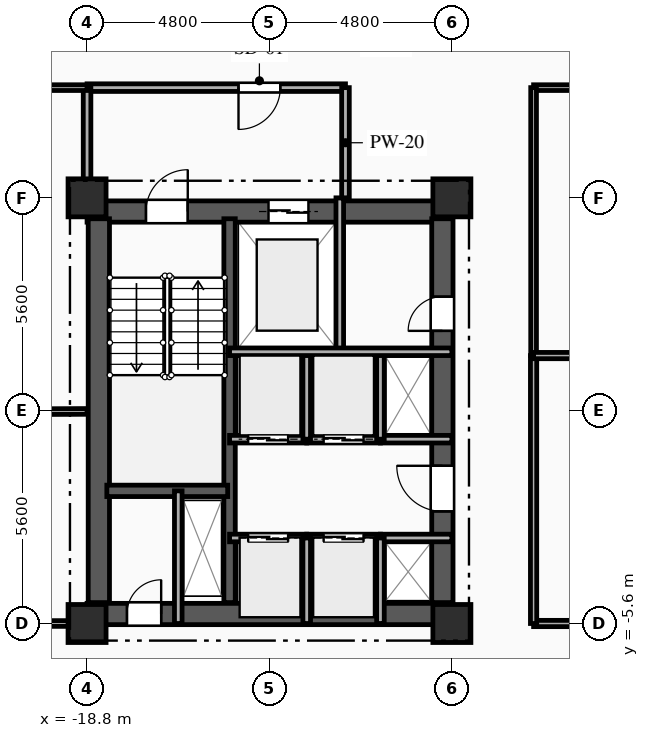
"""IFC4 building model, lengths in metres.
Left out: names, types, materials, properties, quantities, classifications, styles, units other than length and angle.
Written with IfcOpenShell. Run it as: python <this file> out.ifc"""

import sys

from ifc_helpers import new_model, si_unit, direction, frame, frame_2d, origin, origin_2d, place, context, subcontext, project, spatial, rectangle, extrude, element, fill, save


model = new_model("IFC4")
c1 = context("Model", 3, precision=1e-05, world=origin(), true_north=direction((0.0, 1.0)))
c2 = subcontext(c1, "Body", "Model", "MODEL_VIEW")
j1 = project(units=[si_unit("LENGTHUNIT", "METRE"), si_unit("PLANEANGLEUNIT", "RADIAN")], contexts=[c1])
p1 = place(None, origin())
s1 = spatial("IfcSite", under=j1, at=p1, CompositionType="ELEMENT")
p2 = place(p1, origin())
s2 = spatial("IfcBuilding", under=s1, at=p2, CompositionType="ELEMENT")
p3 = place(p2, frame((0.0, 0.0, 115.85)))
s3 = spatial("IfcBuildingStorey", under=s2, at=p3, CompositionType="ELEMENT", Elevation=115.85)
for number, where, z_axis, x_axis in (
    (1, (-18.8, -5.6, 0.0), (0.0, 0.0, 1.0), (1.0, 0.0, 0.0)),
    (2, (-18.8, 5.6, 0.0), (0.0, 0.0, 1.0), (1.0, 0.0, 0.0)),
    (3, (-9.2, -5.6, 0.0), (0.0, 0.0, 1.0), (1.0, 0.0, 0.0)),
    (4, (-9.2, 5.6, 0.0), (0.0, 0.0, 1.0), (1.0, 0.0, 0.0)),
):
    element("IfcColumn", number, at=place(p3, frame(where, z_axis=z_axis, x_axis=x_axis)), inside=s3, PredefinedType="COLUMN", context=c2, shape_type="SweptSolid", body=[
        extrude(rectangle(XDim=1.0, YDim=1.0, at=origin_2d()), origin(), (0.0, 0.0, 1.0), 3.35),
    ])
p4 = place(p3, frame((-18.8, 5.24, 0.0), z_axis=(0.0, 0.0, 1.0), x_axis=(1.0, 0.0, 0.0)))
e5 = element("IfcWall", 5, at=p4, inside=s3, PredefinedType="SHEAR", context=c2, shape_type="SweptSolid", body=[
    extrude(rectangle(XDim=9.6, YDim=0.56, at=frame_2d((4.8, 0.0))), origin(), (0.0, 0.0, 1.0), 3.045),
])
p5 = place(p4, frame((1.55, 0.0, 0.0)))
e6 = element("IfcOpeningElement", 6, at=p5, cuts=e5, PredefinedType="OPENING", context=c2, shape_type="SweptSolid", body=[
    extrude(rectangle(XDim=1.1, YDim=2.15, at=frame_2d((0.55, 1.075))), frame((0.0, 0.29, 0.0), z_axis=(0.0, -1.0, 0.0), x_axis=(1.0, 0.0, 0.0)), (0.0, 0.0, 1.0), 0.58),
])
p6 = place(p4, frame((4.775, 0.0, 0.0)))
e7 = element("IfcOpeningElement", 7, at=p6, cuts=e5, PredefinedType="OPENING", context=c2, shape_type="SweptSolid", body=[
    extrude(rectangle(XDim=1.05, YDim=2.1, at=frame_2d((0.525, 1.05))), frame((0.0, 0.29, 0.0), z_axis=(0.0, -1.0, 0.0), x_axis=(1.0, 0.0, 0.0)), (0.0, 0.0, 1.0), 0.58),
])
p7 = place(p3, frame((-18.8, -5.35, 0.0), z_axis=(0.0, 0.0, 1.0), x_axis=(1.0, 0.0, 0.0)))
e8 = element("IfcWall", 8, at=p7, inside=s3, PredefinedType="SHEAR", context=c2, shape_type="SweptSolid", body=[
    extrude(rectangle(XDim=9.6, YDim=0.56, at=frame_2d((4.8, 0.0))), origin(), (0.0, 0.0, 1.0), 3.045),
])
p8 = place(p7, frame((1.05, 0.0, 0.0)))
e9 = element("IfcOpeningElement", 9, at=p8, cuts=e8, PredefinedType="OPENING", context=c2, shape_type="SweptSolid", body=[
    extrude(rectangle(XDim=0.9, YDim=2.1, at=frame_2d((0.45, 1.05))), frame((0.0, 0.29, 0.0), z_axis=(0.0, -1.0, 0.0), x_axis=(1.0, 0.0, 0.0)), (0.0, 0.0, 1.0), 0.58),
])
p9 = place(p3, frame((-18.49, -5.05, 0.0), z_axis=(0.0, 0.0, 1.0), x_axis=(0.0, 1.0, 0.0)))
e10 = element("IfcWall", 10, at=p9, inside=s3, PredefinedType="SHEAR", context=c2, shape_type="SweptSolid", body=[
    extrude(rectangle(XDim=10.1, YDim=0.56, at=frame_2d((5.05, 0.0))), origin(), (0.0, 0.0, 1.0), 3.045),
])
p10 = place(p3, frame((-9.45, -5.05, 0.0), z_axis=(0.0, 0.0, 1.0), x_axis=(0.0, 1.0, 0.0)))
e11 = element("IfcWall", 11, at=p10, inside=s3, PredefinedType="SHEAR", context=c2, shape_type="SweptSolid", body=[
    extrude(rectangle(XDim=10.1, YDim=0.56, at=frame_2d((5.05, 0.0))), origin(), (0.0, 0.0, 1.0), 3.045),
])
p11 = place(p10, frame((7.15, 0.0, 0.0)))
e12 = element("IfcOpeningElement", 12, at=p11, cuts=e11, PredefinedType="OPENING", context=c2, shape_type="SweptSolid", body=[
    extrude(rectangle(XDim=0.9, YDim=2.1, at=frame_2d((0.45, 1.05))), frame((0.0, 0.29, 0.0), z_axis=(0.0, -1.0, 0.0), x_axis=(1.0, 0.0, 0.0)), (0.0, 0.0, 1.0), 0.58),
])
p12 = place(p10, frame((2.4, 0.0, 0.0)))
e13 = element("IfcOpeningElement", 13, at=p12, cuts=e11, PredefinedType="OPENING", context=c2, shape_type="SweptSolid", body=[
    extrude(rectangle(XDim=1.2, YDim=2.15, at=frame_2d((0.6, 1.075))), frame((0.0, 0.29, 0.0), z_axis=(0.0, -1.0, 0.0), x_axis=(1.0, 0.0, 0.0)), (0.0, 0.0, 1.0), 0.58),
])
p13 = place(p3, frame((-15.05, -5.05, 0.0), z_axis=(0.0, 0.0, 1.0), x_axis=(0.0, 1.0, 0.0)))
e14 = element("IfcWall", 14, at=p13, inside=s3, PredefinedType="SHEAR", context=c2, shape_type="SweptSolid", body=[
    extrude(rectangle(XDim=10.1, YDim=0.3, at=frame_2d((5.05, 0.0))), origin(), (0.0, 0.0, 1.0), 3.045),
])
p14 = place(p3, frame((-18.28, -2.11, 0.0), z_axis=(0.0, 0.0, 1.0), x_axis=(1.0, 0.0, 0.0)))
e15 = element("IfcWall", 15, at=p14, inside=s3, PredefinedType="SHEAR", context=c2, shape_type="SweptSolid", body=[
    extrude(rectangle(XDim=3.18, YDim=0.3, at=frame_2d((1.59, 0.0))), origin(), (0.0, 0.0, 1.0), 3.045),
])
p15 = place(p3, frame((-16.4, -5.6, 0.0), z_axis=(0.0, 0.0, 1.0), x_axis=(0.0, 1.0, 0.0)))
e16 = element("IfcWall", 16, at=p15, inside=s3, PredefinedType="PARTITIONING", context=c2, shape_type="SweptSolid", body=[
    extrude(rectangle(XDim=3.49, YDim=0.2, at=frame_2d((1.745, 0.0))), origin(), (0.0, 0.0, 1.0), 3.045),
])
p16 = place(p3, frame((-12.15, 1.55, 0.0), z_axis=(0.0, 0.0, 1.0), x_axis=(0.0, 1.0, 0.0)))
e17 = element("IfcWall", 17, at=p16, inside=s3, PredefinedType="PARTITIONING", context=c2, shape_type="SweptSolid", body=[
    extrude(rectangle(XDim=4.05, YDim=0.2, at=frame_2d((2.025, 0.0))), origin(), (0.0, 0.0, 1.0), 3.045),
])
p17 = place(p3, frame((-12.0, 8.5, 0.0), z_axis=(0.0, 0.0, 1.0), x_axis=(-1.0, 0.0, 0.0)))
e18 = element("IfcWall", 18, at=p17, inside=s3, PredefinedType="PARTITIONING", context=c2, shape_type="SweptSolid", body=[
    extrude(rectangle(XDim=6.8, YDim=0.2, at=frame_2d((3.4, 0.0))), origin(), (0.0, 0.0, 1.0), 3.045),
])
p18 = place(p17, frame((1.715, 0.0, 0.0)))
e19 = element("IfcOpeningElement", 19, at=p18, cuts=e18, PredefinedType="OPENING", context=c2, shape_type="SweptSolid", body=[
    extrude(rectangle(XDim=1.1, YDim=2.15, at=frame_2d((0.55, 1.075))), frame((0.0, 0.11, 0.0), z_axis=(0.0, -1.0, 0.0), x_axis=(1.0, 0.0, 0.0)), (0.0, 0.0, 1.0), 0.22),
])
p19 = place(p3, frame((-12.0, 5.6, 0.0), z_axis=(0.0, 0.0, 1.0), x_axis=(0.0, 1.0, 0.0)))
e20 = element("IfcWall", 20, at=p19, inside=s3, PredefinedType="PARTITIONING", context=c2, shape_type="SweptSolid", body=[
    extrude(rectangle(XDim=2.9, YDim=0.2, at=frame_2d((1.45, 0.0))), origin(), (0.0, 0.0, 1.0), 3.045),
])
p20 = place(p3, frame((-18.8, 8.5, 0.0), z_axis=(0.0, 0.0, 1.0), x_axis=(0.0, -1.0, 0.0)))
e21 = element("IfcWall", 21, at=p20, inside=s3, PredefinedType="PARTITIONING", context=c2, shape_type="SweptSolid", body=[
    extrude(rectangle(XDim=2.9, YDim=0.2, at=frame_2d((1.45, 0.0))), origin(), (0.0, 0.0, 1.0), 2.53),
])
p21 = place(p3, frame((-15.05, -3.35, 0.0), z_axis=(0.0, 0.0, 1.0), x_axis=(1.0, 0.0, 0.0)))
e22 = element("IfcWall", 22, at=p21, inside=s3, PredefinedType="PARTITIONING", context=c2, shape_type="SweptSolid", body=[
    extrude(rectangle(XDim=2.03, YDim=0.2, at=frame_2d((1.015, 0.0))), origin(), (0.0, 0.0, 1.0), 3.045),
])
p22 = place(p21, frame((0.49, 0.0, 0.0)))
e23 = element("IfcOpeningElement", 23, at=p22, cuts=e22, PredefinedType="OPENING", context=c2, shape_type="SweptSolid", body=[
    extrude(rectangle(XDim=1.05, YDim=2.1, at=frame_2d((0.525, 1.05))), frame((0.0, 0.11, 0.0), z_axis=(0.0, -1.0, 0.0), x_axis=(1.0, 0.0, 0.0)), (0.0, 0.0, 1.0), 0.22),
])
p23 = place(p3, frame((-13.02, -3.35, 0.0), z_axis=(0.0, 0.0, 1.0), x_axis=(1.0, 0.0, 0.0)))
e24 = element("IfcWall", 24, at=p23, inside=s3, PredefinedType="PARTITIONING", context=c2, shape_type="SweptSolid", body=[
    extrude(rectangle(XDim=1.94, YDim=0.2, at=frame_2d((0.97, 0.0))), origin(), (0.0, 0.0, 1.0), 3.045),
])
p24 = place(p23, frame((0.445, 0.0, 0.0)))
e25 = element("IfcOpeningElement", 25, at=p24, cuts=e24, PredefinedType="OPENING", context=c2, shape_type="SweptSolid", body=[
    extrude(rectangle(XDim=1.05, YDim=2.1, at=frame_2d((0.525, 1.05))), frame((0.0, 0.11, 0.0), z_axis=(0.0, -1.0, 0.0), x_axis=(1.0, 0.0, 0.0)), (0.0, 0.0, 1.0), 0.22),
])
p25 = place(p3, frame((-11.08, -3.35, 0.0), z_axis=(0.0, 0.0, 1.0), x_axis=(1.0, 0.0, 0.0)))
e26 = element("IfcWall", 26, at=p25, inside=s3, PredefinedType="PARTITIONING", context=c2, shape_type="SweptSolid", body=[
    extrude(rectangle(XDim=1.88, YDim=0.2, at=frame_2d((0.94, 0.0))), origin(), (0.0, 0.0, 1.0), 2.76),
])
p26 = place(p3, frame((-13.02, -0.75, 0.0), z_axis=(0.0, 0.0, 1.0), x_axis=(-1.0, 0.0, 0.0)))
e27 = element("IfcWall", 27, at=p26, inside=s3, PredefinedType="PARTITIONING", context=c2, shape_type="SweptSolid", body=[
    extrude(rectangle(XDim=2.03, YDim=0.2, at=frame_2d((1.015, 0.0))), origin(), (0.0, 0.0, 1.0), 3.045),
])
p27 = place(p26, frame((0.49, 0.0, 0.0)))
e28 = element("IfcOpeningElement", 28, at=p27, cuts=e27, PredefinedType="OPENING", context=c2, shape_type="SweptSolid", body=[
    extrude(rectangle(XDim=1.05, YDim=2.1, at=frame_2d((0.525, 1.05))), frame((0.0, 0.11, 0.0), z_axis=(0.0, -1.0, 0.0), x_axis=(1.0, 0.0, 0.0)), (0.0, 0.0, 1.0), 0.22),
])
p28 = place(p3, frame((-11.08, -0.75, 0.0), z_axis=(0.0, 0.0, 1.0), x_axis=(-1.0, 0.0, 0.0)))
e29 = element("IfcWall", 29, at=p28, inside=s3, PredefinedType="PARTITIONING", context=c2, shape_type="SweptSolid", body=[
    extrude(rectangle(XDim=1.94, YDim=0.2, at=frame_2d((0.97, 0.0))), origin(), (0.0, 0.0, 1.0), 3.045),
])
p29 = place(p28, frame((0.445, 0.0, 0.0)))
e30 = element("IfcOpeningElement", 30, at=p29, cuts=e29, PredefinedType="OPENING", context=c2, shape_type="SweptSolid", body=[
    extrude(rectangle(XDim=1.05, YDim=2.1, at=frame_2d((0.525, 1.05))), frame((0.0, 0.11, 0.0), z_axis=(0.0, -1.0, 0.0), x_axis=(1.0, 0.0, 0.0)), (0.0, 0.0, 1.0), 0.22),
])
p30 = place(p3, frame((-9.2, -0.75, 0.0), z_axis=(0.0, 0.0, 1.0), x_axis=(-1.0, 0.0, 0.0)))
e31 = element("IfcWall", 31, at=p30, inside=s3, PredefinedType="PARTITIONING", context=c2, shape_type="SweptSolid", body=[
    extrude(rectangle(XDim=1.88, YDim=0.2, at=frame_2d((0.94, 0.0))), origin(), (0.0, 0.0, 1.0), 3.045),
])
for number, where, z_axis, x_axis in (
    (32, (-13.02, -5.6, 0.0), (0.0, 0.0, 1.0), (0.0, 1.0, 0.0)),
    (33, (-11.08, -5.6, 0.0), (0.0, 0.0, 1.0), (0.0, 1.0, 0.0)),
):
    element("IfcWall", number, at=place(p3, frame(where, z_axis=z_axis, x_axis=x_axis)), inside=s3, PredefinedType="PARTITIONING", context=c2, shape_type="SweptSolid", body=[
        extrude(rectangle(XDim=2.25, YDim=0.2, at=frame_2d((1.125, 0.0))), origin(), (0.0, 0.0, 1.0), 3.045),
    ])
for number, where, z_axis, x_axis in (
    (34, (-13.02, -0.75, 0.0), (0.0, 0.0, 1.0), (0.0, 1.0, 0.0)),
    (35, (-11.08, -0.75, 0.0), (0.0, 0.0, 1.0), (0.0, 1.0, 0.0)),
):
    element("IfcWall", number, at=place(p3, frame(where, z_axis=z_axis, x_axis=x_axis)), inside=s3, PredefinedType="PARTITIONING", context=c2, shape_type="SweptSolid", body=[
        extrude(rectangle(XDim=2.3, YDim=0.2, at=frame_2d((1.15, 0.0))), origin(), (0.0, 0.0, 1.0), 3.045),
    ])
p31 = place(p3, frame((-18.8, 8.5, 0.0), z_axis=(0.0, 0.0, 1.0), x_axis=(-1.0, 0.0, 0.0)))
e36 = element("IfcWall", 36, at=p31, inside=s3, PredefinedType="PARTITIONING", context=c2, shape_type="SweptSolid", body=[
    extrude(rectangle(XDim=4.2, YDim=0.15, at=frame_2d((2.1, 0.0))), origin(), (0.0, 0.0, 1.0), 3.045),
])
p32 = place(p31, frame((2.321, 0.0, 0.0)))
e37 = element("IfcOpeningElement", 37, at=p32, cuts=e36, PredefinedType="OPENING", context=c2, shape_type="SweptSolid", body=[
    extrude(rectangle(XDim=1.05, YDim=2.15, at=frame_2d((0.525, 1.075))), frame((0.0, 0.085, 0.0), z_axis=(0.0, -1.0, 0.0), x_axis=(1.0, 0.0, 0.0)), (0.0, 0.0, 1.0), 0.17),
])
p33 = place(p3, frame((0.0, 8.5, 0.0), z_axis=(0.0, 0.0, 1.0), x_axis=(-1.0, 0.0, 0.0)))
e38 = element("IfcWall", 38, at=p33, inside=s3, PredefinedType="PARTITIONING", context=c2, shape_type="SweptSolid", body=[
    extrude(rectangle(XDim=7.05, YDim=0.15, at=frame_2d((3.525, 0.0))), origin(), (0.0, 0.0, 1.0), 3.045),
])
p34 = place(p33, frame((1.185, 0.0, 0.0)))
e39 = element("IfcOpeningElement", 39, at=p34, cuts=e38, PredefinedType="OPENING", context=c2, shape_type="SweptSolid", body=[
    extrude(rectangle(XDim=1.05, YDim=2.15, at=frame_2d((0.525, 1.075))), frame((0.0, 0.085, 0.0), z_axis=(0.0, -1.0, 0.0), x_axis=(1.0, 0.0, 0.0)), (0.0, 0.0, 1.0), 0.17),
])
p35 = place(p3, frame((-23.0, -5.6, 0.0), z_axis=(0.0, 0.0, 1.0), x_axis=(1.0, 0.0, 0.0)))
e40 = element("IfcWall", 40, at=p35, inside=s3, PredefinedType="PARTITIONING", context=c2, shape_type="SweptSolid", body=[
    extrude(rectangle(XDim=4.2, YDim=0.15, at=frame_2d((2.1, 0.0))), origin(), (0.0, 0.0, 1.0), 3.045),
])
p36 = place(p35, frame((0.829, 0.0, 0.0)))
e41 = element("IfcOpeningElement", 41, at=p36, cuts=e40, PredefinedType="OPENING", context=c2, shape_type="SweptSolid", body=[
    extrude(rectangle(XDim=1.05, YDim=2.15, at=frame_2d((0.525, 1.075))), frame((0.0, 0.085, 0.0), z_axis=(0.0, -1.0, 0.0), x_axis=(1.0, 0.0, 0.0)), (0.0, 0.0, 1.0), 0.17),
])
p37 = place(p3, frame((-7.05, -5.6, 0.0), z_axis=(0.0, 0.0, 1.0), x_axis=(1.0, 0.0, 0.0)))
e42 = element("IfcWall", 42, at=p37, inside=s3, PredefinedType="PARTITIONING", context=c2, shape_type="SweptSolid", body=[
    extrude(rectangle(XDim=7.05, YDim=0.165, at=frame_2d((3.525, 0.0))), origin(), (0.0, 0.0, 1.0), 2.53),
])
p38 = place(p37, frame((4.728, 0.0, 0.0)))
e43 = element("IfcOpeningElement", 43, at=p38, cuts=e42, PredefinedType="OPENING", context=c2, shape_type="SweptSolid", body=[
    extrude(rectangle(XDim=1.15, YDim=2.15, at=frame_2d((0.575, 1.075))), frame((0.0, 0.093, 0.0), z_axis=(0.0, -1.0, 0.0), x_axis=(1.0, 0.0, 0.0)), (0.0, 0.0, 1.0), 0.185),
])
p39 = place(p3, frame((-7.05, 1.45, 0.0), z_axis=(0.0, 0.0, 1.0), x_axis=(0.0, -1.0, 0.0)))
e44 = element("IfcWall", 44, at=p39, inside=s3, PredefinedType="PARTITIONING", context=c2, shape_type="SweptSolid", body=[
    extrude(rectangle(XDim=7.05, YDim=0.165, at=frame_2d((3.525, 0.0))), origin(), (0.0, 0.0, 1.0), 3.045),
])
p40 = place(p3, frame((-7.05, 8.5, 0.0), z_axis=(0.0, 0.0, 1.0), x_axis=(0.0, -1.0, 0.0)))
e45 = element("IfcWall", 45, at=p40, inside=s3, PredefinedType="PARTITIONING", context=c2, shape_type="SweptSolid", body=[
    extrude(rectangle(XDim=7.05, YDim=0.15, at=frame_2d((3.525, 0.0))), origin(), (0.0, 0.0, 1.0), 3.045),
])
p41 = place(p3, frame((-28.671, -0.064, 0.0), z_axis=(0.0, 0.0, 1.0), x_axis=(0.999990089865, 0.004451985263, 0.0)))
e46 = element("IfcWall", 46, at=p41, inside=s3, PredefinedType="PARTITIONING", context=c2, shape_type="SweptSolid", body=[
    extrude(rectangle(XDim=9.871, YDim=0.15, at=frame_2d((4.936, 0.0))), origin(), (0.0, 0.0, 1.0), 3.045),
])
p42 = place(p3, frame((-7.05, 1.45, 0.0), z_axis=(0.0, 0.0, 1.0), x_axis=(1.0, 0.0, 0.0)))
e47 = element("IfcWall", 47, at=p42, inside=s3, PredefinedType="PARTITIONING", context=c2, shape_type="SweptSolid", body=[
    extrude(rectangle(XDim=14.1, YDim=0.165, at=frame_2d((7.05, 0.0))), origin(), (0.0, 0.0, 1.0), 3.045),
])
p43 = place(p3, frame((-15.05, 1.55, 0.0), z_axis=(0.0, 0.0, 1.0), x_axis=(1.0, 0.0, 0.0)))
e48 = element("IfcWall", 48, at=p43, inside=s3, PredefinedType="PARTITIONING", context=c2, shape_type="SweptSolid", body=[
    extrude(rectangle(XDim=5.85, YDim=0.2, at=frame_2d((2.925, 0.0))), origin(), (0.0, 0.0, 1.0), 3.045),
])
p44 = place(p5, origin())
e49 = element("IfcDoor", 49, at=p44, inside=s3, OperationType="SINGLE_SWING_RIGHT", PredefinedType="DOOR", context=c2, shape_type="SweptSolid", body=[
    extrude(rectangle(XDim=1.1, YDim=2.15, at=frame_2d((0.55, 1.075))), frame((0.0, 0.025, 0.0), z_axis=(0.0, -1.0, 0.0), x_axis=(1.0, 0.0, 0.0)), (0.0, 0.0, 1.0), 0.05),
])
fill(e6, e49)
p45 = place(p6, origin())
e50 = element("IfcDoor", 50, at=p45, inside=s3, OperationType="DOUBLE_DOOR_SLIDING", PredefinedType="DOOR", context=c2, shape_type="SweptSolid", body=[
    extrude(rectangle(XDim=1.05, YDim=2.1, at=frame_2d((0.525, 1.05))), frame((0.0, 0.025, 0.0), z_axis=(0.0, -1.0, 0.0), x_axis=(1.0, 0.0, 0.0)), (0.0, 0.0, 1.0), 0.05),
])
fill(e7, e50)
p46 = place(p8, origin())
e51 = element("IfcDoor", 51, at=p46, inside=s3, OperationType="SINGLE_SWING_RIGHT", PredefinedType="DOOR", context=c2, shape_type="SweptSolid", body=[
    extrude(rectangle(XDim=0.9, YDim=2.1, at=frame_2d((0.45, 1.05))), frame((0.0, 0.025, 0.0), z_axis=(0.0, -1.0, 0.0), x_axis=(1.0, 0.0, 0.0)), (0.0, 0.0, 1.0), 0.05),
])
fill(e9, e51)
p47 = place(p18, origin())
e52 = element("IfcDoor", 52, at=p47, inside=s3, OperationType="SINGLE_SWING_RIGHT", PredefinedType="DOOR", context=c2, shape_type="SweptSolid", body=[
    extrude(rectangle(XDim=1.1, YDim=2.15, at=frame_2d((0.55, 1.075))), frame((0.0, 0.025, 0.0), z_axis=(0.0, -1.0, 0.0), x_axis=(1.0, 0.0, 0.0)), (0.0, 0.0, 1.0), 0.05),
])
fill(e19, e52)
p48 = place(p11, origin())
e53 = element("IfcDoor", 53, at=p48, inside=s3, OperationType="SINGLE_SWING_LEFT", PredefinedType="DOOR", context=c2, shape_type="SweptSolid", body=[
    extrude(rectangle(XDim=0.9, YDim=2.1, at=frame_2d((0.45, 1.05))), frame((0.0, 0.025, 0.0), z_axis=(0.0, -1.0, 0.0), x_axis=(1.0, 0.0, 0.0)), (0.0, 0.0, 1.0), 0.05),
])
fill(e12, e53)
p49 = place(p22, origin())
e54 = element("IfcDoor", 54, at=p49, inside=s3, OperationType="DOUBLE_DOOR_SLIDING", PredefinedType="DOOR", context=c2, shape_type="SweptSolid", body=[
    extrude(rectangle(XDim=1.05, YDim=2.1, at=frame_2d((0.525, 1.05))), frame((0.0, 0.025, 0.0), z_axis=(0.0, -1.0, 0.0), x_axis=(1.0, 0.0, 0.0)), (0.0, 0.0, 1.0), 0.05),
])
fill(e23, e54)
p50 = place(p24, origin())
e55 = element("IfcDoor", 55, at=p50, inside=s3, OperationType="DOUBLE_DOOR_SLIDING", PredefinedType="DOOR", context=c2, shape_type="SweptSolid", body=[
    extrude(rectangle(XDim=1.05, YDim=2.1, at=frame_2d((0.525, 1.05))), frame((0.0, 0.025, 0.0), z_axis=(0.0, -1.0, 0.0), x_axis=(1.0, 0.0, 0.0)), (0.0, 0.0, 1.0), 0.05),
])
fill(e25, e55)
p51 = place(p27, origin())
e56 = element("IfcDoor", 56, at=p51, inside=s3, OperationType="DOUBLE_DOOR_SLIDING", PredefinedType="DOOR", context=c2, shape_type="SweptSolid", body=[
    extrude(rectangle(XDim=1.05, YDim=2.1, at=frame_2d((0.525, 1.05))), frame((0.0, 0.025, 0.0), z_axis=(0.0, -1.0, 0.0), x_axis=(1.0, 0.0, 0.0)), (0.0, 0.0, 1.0), 0.05),
])
fill(e28, e56)
p52 = place(p29, origin())
e57 = element("IfcDoor", 57, at=p52, inside=s3, OperationType="DOUBLE_DOOR_SLIDING", PredefinedType="DOOR", context=c2, shape_type="SweptSolid", body=[
    extrude(rectangle(XDim=1.05, YDim=2.1, at=frame_2d((0.525, 1.05))), frame((0.0, 0.025, 0.0), z_axis=(0.0, -1.0, 0.0), x_axis=(1.0, 0.0, 0.0)), (0.0, 0.0, 1.0), 0.05),
])
fill(e30, e57)
p53 = place(p12, origin())
e58 = element("IfcDoor", 58, at=p53, inside=s3, OperationType="SINGLE_SWING_RIGHT", PredefinedType="DOOR", context=c2, shape_type="SweptSolid", body=[
    extrude(rectangle(XDim=1.2, YDim=2.15, at=frame_2d((0.6, 1.075))), frame((0.0, 0.025, 0.0), z_axis=(0.0, -1.0, 0.0), x_axis=(1.0, 0.0, 0.0)), (0.0, 0.0, 1.0), 0.05),
])
fill(e13, e58)
save(model, sys.argv[1])
